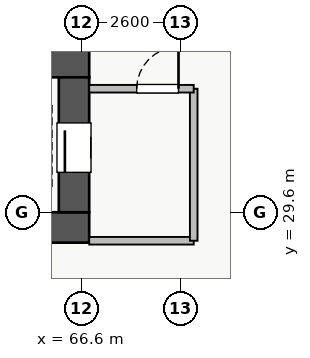
"""IFC4 building model, lengths in metres.
Left out: names, types, materials, properties, quantities, classifications, styles, units other than length and angle.
Written with IfcOpenShell. Run it as: python <this file> out.ifc"""

import sys

from ifc_helpers import new_model, si_unit, direction, frame, frame_2d, origin, place, context, subcontext, project, spatial, rectangle, extrude, source, transform, mapped, element, fill, save


model = new_model("IFC4")
c1 = context("Model", 3, precision=1e-05, world=origin(), true_north=direction((0.0, 1.0)))
c2 = subcontext(c1, "Body", "Model", "MODEL_VIEW")
j1 = project(units=[si_unit("LENGTHUNIT", "METRE"), si_unit("PLANEANGLEUNIT", "RADIAN")], contexts=[c1])
p1 = place(None, origin())
s1 = spatial("IfcSite", under=j1, at=p1, CompositionType="ELEMENT")
p2 = place(p1, origin())
s2 = spatial("IfcBuilding", under=s1, at=p2, CompositionType="ELEMENT")
p3 = place(p2, origin())
s3 = spatial("IfcBuildingStorey", under=s2, at=p3, CompositionType="ELEMENT", Elevation=0.0)
p4 = place(p3, frame((54.2, 29.2, 0.0), z_axis=(0.0, 0.0, 1.0), x_axis=(1.0, 0.0, 0.0)))
e1 = element("IfcWall", 1, at=p4, inside=s3, PredefinedType="SHEAR", context=c2, shape_type="SweptSolid", body=[
    extrude(rectangle(XDim=12.6, YDim=0.8, at=frame_2d((6.3, 0.0))), origin(), (0.0, 0.0, 1.0), 5.0),
])
p5 = place(p3, frame((54.2, 33.55, 0.0), z_axis=(0.0, 0.0, 1.0), x_axis=(1.0, 0.0, 0.0)))
e2 = element("IfcWall", 2, at=p5, inside=s3, PredefinedType="SHEAR", context=c2, shape_type="SweptSolid", body=[
    extrude(rectangle(XDim=12.6, YDim=0.8, at=frame_2d((6.3, 0.0))), origin(), (0.0, 0.0, 1.0), 5.0),
])
p6 = place(p5, frame((8.2, 0.0, 0.0)))
e3 = element("IfcOpeningElement", 3, at=p6, cuts=e2, PredefinedType="OPENING", context=c2, shape_type="SweptSolid", body=[
    extrude(rectangle(XDim=1.1, YDim=2.05, at=frame_2d((0.55, 1.025))), frame((0.0, 0.41, 0.0), z_axis=(0.0, -1.0, 0.0), x_axis=(1.0, 0.0, 0.0)), (0.0, 0.0, 1.0), 0.82),
])
p7 = place(p3, frame((66.4, 29.6, 0.0), z_axis=(0.0, 0.0, 1.0), x_axis=(0.0, 1.0, 0.0)))
e4 = element("IfcWall", 4, at=p7, inside=s3, PredefinedType="SHEAR", context=c2, shape_type="SweptSolid", body=[
    extrude(rectangle(XDim=3.55, YDim=0.8, at=frame_2d((1.775, 0.0))), origin(), (0.0, 0.0, 1.0), 5.0),
])
p8 = place(p7, frame((1.05, 0.0, 0.0)))
e5 = element("IfcOpeningElement", 5, at=p8, cuts=e4, PredefinedType="OPENING", context=c2, shape_type="SweptSolid", body=[
    extrude(rectangle(XDim=1.3, YDim=2.05, at=frame_2d((0.65, 1.025))), frame((0.0, 0.41, 0.0), z_axis=(0.0, -1.0, 0.0), x_axis=(1.0, 0.0, 0.0)), (0.0, 0.0, 1.0), 0.82),
])
p9 = place(p3, frame((66.8, 28.85, 0.0), z_axis=(0.0, 0.0, 1.0), x_axis=(1.0, 0.0, 0.0)))
e6 = element("IfcWall", 6, at=p9, inside=s3, PredefinedType="PARTITIONING", context=c2, shape_type="SweptSolid", body=[
    extrude(rectangle(XDim=2.75, YDim=0.2, at=frame_2d((1.375, 0.0))), origin(), (0.0, 0.0, 1.0), 4.78),
])
p10 = place(p3, frame((69.55, 28.85, 0.0), z_axis=(0.0, 0.0, 1.0), x_axis=(0.0, 1.0, 0.0)))
e7 = element("IfcWall", 7, at=p10, inside=s3, PredefinedType="PARTITIONING", context=c2, shape_type="SweptSolid", body=[
    extrude(rectangle(XDim=4.0, YDim=0.2, at=frame_2d((2.0, 0.0))), origin(), (0.0, 0.0, 1.0), 4.78),
])
p11 = place(p3, frame((66.8, 32.85, 0.0), z_axis=(0.0, 0.0, 1.0), x_axis=(1.0, 0.0, 0.0)))
e8 = element("IfcWall", 8, at=p11, inside=s3, PredefinedType="PARTITIONING", context=c2, shape_type="SweptSolid", body=[
    extrude(rectangle(XDim=2.75, YDim=0.2, at=frame_2d((1.375, 0.0))), origin(), (0.0, 0.0, 1.0), 4.78),
])
p12 = place(p11, frame((1.25, 0.0, 0.0)))
e9 = element("IfcOpeningElement", 9, at=p12, cuts=e8, PredefinedType="OPENING", context=c2, shape_type="SweptSolid", body=[
    extrude(rectangle(XDim=1.1, YDim=2.05, at=frame_2d((0.55, 1.025))), frame((0.0, 0.11, 0.0), z_axis=(0.0, -1.0, 0.0), x_axis=(1.0, 0.0, 0.0)), (0.0, 0.0, 1.0), 0.22),
])
m1 = source(origin(), c2, "Body", "SweptSolid", [
    extrude(rectangle(XDim=1.3, YDim=2.05, at=frame_2d((0.65, 1.025))), frame((0.0, 0.025, 0.0), z_axis=(0.0, -1.0, 0.0), x_axis=(1.0, 0.0, 0.0)), (0.0, 0.0, 1.0), 0.05),
])
p13 = place(p8, origin())
e10 = element("IfcDoor", 10, at=p13, inside=s3, OperationType="SLIDING_TO_LEFT", PredefinedType="DOOR", context=c2, shape_type="MappedRepresentation", body=[
    mapped(m1, transform((0.0, 0.0, 0.0), x_axis=(1.0, 0.0, 0.0), y_axis=(0.0, 1.0, 0.0), z_axis=(0.0, 0.0, 1.0), scale=1.0)),
])
fill(e5, e10)
m2 = source(origin(), c2, "Body", "SweptSolid", [
    extrude(rectangle(XDim=1.1, YDim=2.05, at=frame_2d((0.55, 1.025))), frame((0.0, 0.025, 0.0), z_axis=(0.0, -1.0, 0.0), x_axis=(1.0, 0.0, 0.0)), (0.0, 0.0, 1.0), 0.05),
])
p14 = place(p12, origin())
e11 = element("IfcDoor", 11, at=p14, inside=s3, OperationType="SINGLE_SWING_RIGHT", PredefinedType="DOOR", context=c2, shape_type="MappedRepresentation", body=[
    mapped(m2, transform((0.0, 0.0, 0.0), x_axis=(1.0, 0.0, 0.0), y_axis=(0.0, 1.0, 0.0), z_axis=(0.0, 0.0, 1.0), scale=1.0)),
])
fill(e9, e11)
save(model, sys.argv[1])
